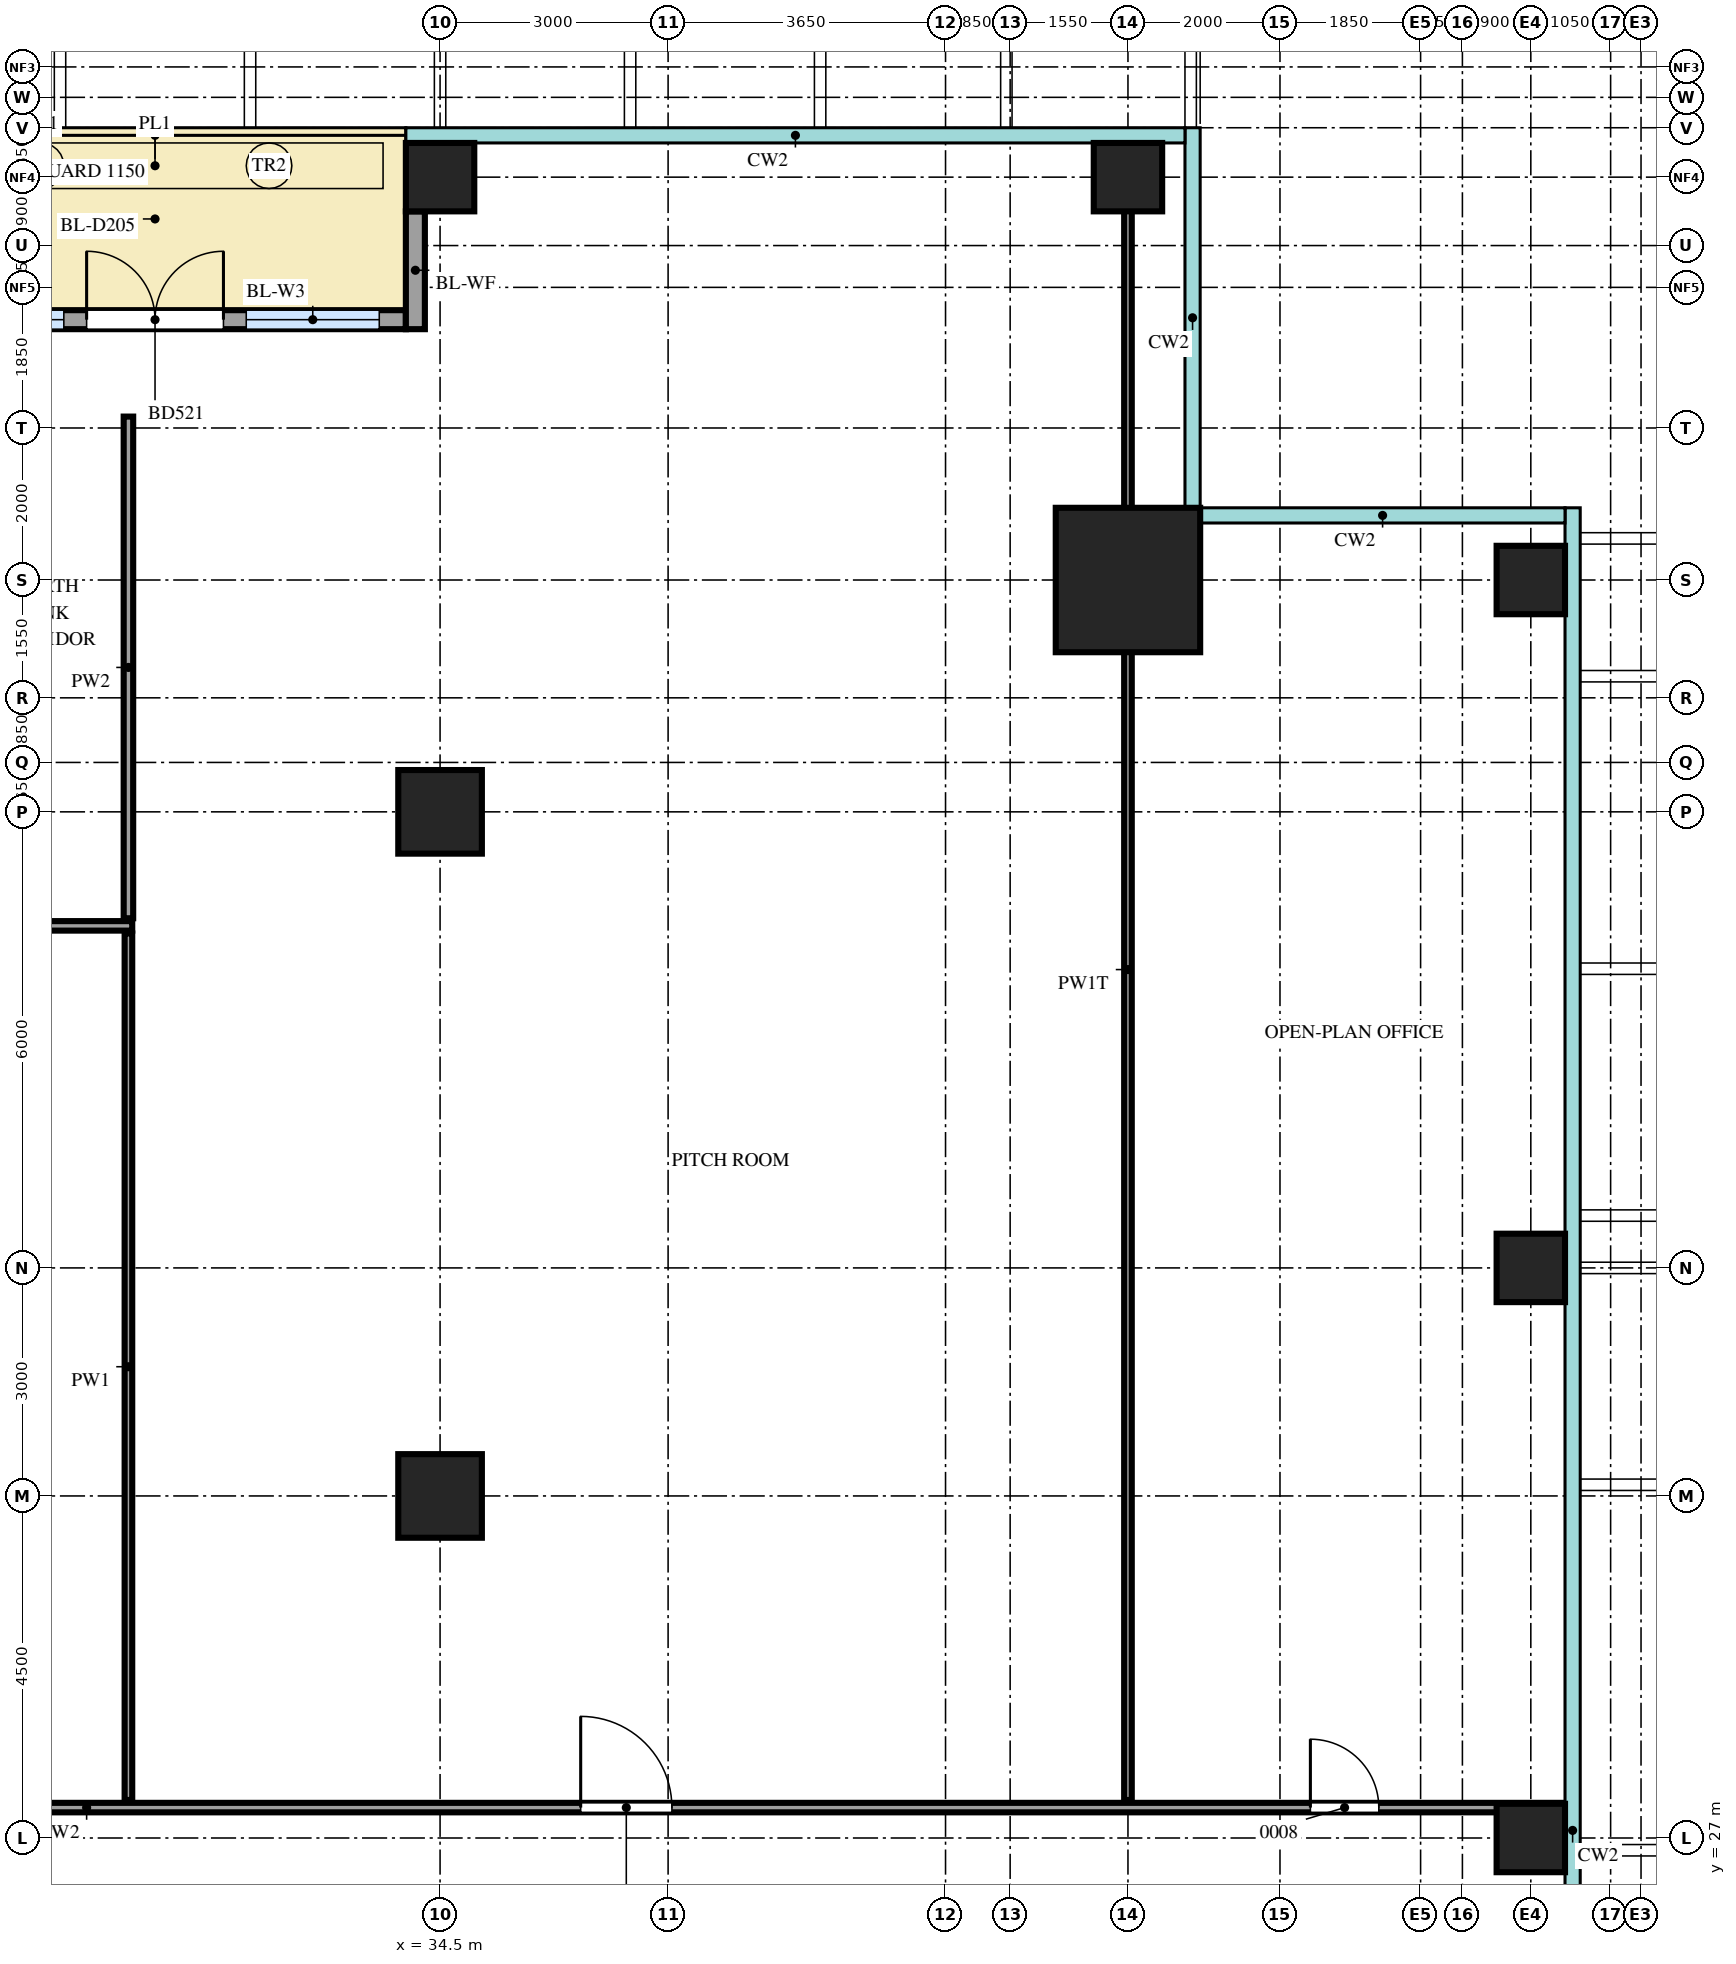
"""IFC4 building model, lengths in metres.
Left out: names, types, materials, properties, quantities, classifications, styles, units other than length and angle.
Written with IfcOpenShell. Run it as: python <this file> out.ifc"""

import sys

from ifc_helpers import new_model, si_unit, direction, frame, frame_2d, origin, origin_2d, place, context, subcontext, project, spatial, rectangle, extrude, source, transform, mapped, element, fill, save


model = new_model("IFC4")
c1 = context("Model", 3, precision=1e-05, world=origin(), true_north=direction((0.0, 1.0)))
c2 = subcontext(c1, "Body", "Model", "MODEL_VIEW")
j1 = project(units=[si_unit("LENGTHUNIT", "METRE"), si_unit("PLANEANGLEUNIT", "RADIAN")], contexts=[c1])
p1 = place(None, origin())
s1 = spatial("IfcSite", under=j1, at=p1, CompositionType="ELEMENT")
p2 = place(p1, origin())
s2 = spatial("IfcBuilding", under=s1, at=p2, CompositionType="ELEMENT")
p3 = place(p2, frame((0.0, 0.0, 234.2)))
s3 = spatial("IfcBuildingStorey", under=s2, at=p3, CompositionType="ELEMENT", Elevation=234.2)
m1 = source(origin(), c2, "Body", "SweptSolid", [
    extrude(rectangle(XDim=1.9, YDim=1.9, at=origin_2d()), origin(), (0.0, 0.0, 1.0), 4.0),
])
p4 = place(p3, frame((43.55, 43.55, 0.0), z_axis=(0.0, 0.0, 1.0), x_axis=(1.0, 0.0, 0.0)))
e1 = element("IfcColumn", 1, at=p4, inside=s3, PredefinedType="COLUMN", context=c2, shape_type="MappedRepresentation", body=[
    mapped(m1, transform((0.0, 0.0, 0.0))),
])
m2 = source(origin(), c2, "Body", "SweptSolid", [
    extrude(rectangle(XDim=0.9, YDim=0.9, at=origin_2d()), origin(), (0.0, 0.0, 1.0), 3.75),
])
for number, where, z_axis, x_axis in (
    (2, (48.85, 27.0, 0.0), (0.0, 0.0, 1.0), (1.0, 0.0, 0.0)),
    (3, (48.85, 34.5, 0.0), (0.0, 0.0, 1.0), (1.0, 0.0, 0.0)),
    (4, (48.85, 43.55, 0.0), (0.0, 0.0, 1.0), (1.0, 0.0, 0.0)),
    (5, (34.5, 48.85, 0.0), (0.0, 0.0, 1.0), (1.0, 0.0, 0.0)),
    (6, (43.55, 48.85, 0.0), (0.0, 0.0, 1.0), (1.0, 0.0, 0.0)),
):
    element("IfcColumn", number, at=place(p3, frame(where, z_axis=z_axis, x_axis=x_axis)), inside=s3, PredefinedType="COLUMN", context=c2, shape_type="MappedRepresentation", body=[
        mapped(m2, transform((0.0, 0.0, 0.0))),
    ])
m3 = source(origin(), c2, "Body", "SweptSolid", [
    extrude(rectangle(XDim=1.1, YDim=1.1, at=origin_2d()), origin(), (0.0, 0.0, 1.0), 3.75),
])
for number, where, z_axis, x_axis in (
    (7, (34.5, 31.5, 0.0), (0.0, 0.0, 1.0), (1.0, 0.0, 0.0)),
    (8, (34.5, 40.5, 0.0), (0.0, 0.0, 1.0), (1.0, 0.0, 0.0)),
):
    element("IfcColumn", number, at=place(p3, frame(where, z_axis=z_axis, x_axis=x_axis)), inside=s3, PredefinedType="COLUMN", context=c2, shape_type="MappedRepresentation", body=[
        mapped(m3, transform((0.0, 0.0, 0.0))),
    ])
m4 = source(origin(), c2, "Body", "SweptSolid", [
    extrude(rectangle(XDim=6.6, YDim=0.25, at=frame_2d((3.3, 0.0))), origin(), (0.0, 0.0, 1.0), 3.75),
])
p5 = place(p3, frame((27.45, 46.975, 0.0), z_axis=(0.0, 0.0, 1.0), x_axis=(1.0, 0.0, 0.0)))
e9 = element("IfcWall", 9, at=p5, inside=s3, PredefinedType="SOLIDWALL", context=c2, shape_type="MappedRepresentation", body=[
    mapped(m4, transform((0.0, 0.0, 0.0))),
])
m5 = source(origin(), c2, "Body", "SweptSolid", [
    extrude(rectangle(XDim=1.75, YDim=2.4, at=frame_2d((0.875, 1.2))), frame((0.0, 0.135, 0.0), z_axis=(0.0, -1.0, 0.0), x_axis=(1.0, 0.0, 0.0)), (0.0, 0.0, 1.0), 0.27),
])
p6 = place(p5, frame((0.35, 0.0, 0.0)))
e10 = element("IfcOpeningElement", 10, at=p6, cuts=e9, PredefinedType="OPENING", context=c2, shape_type="MappedRepresentation", body=[
    mapped(m5, transform((0.0, 0.0, 0.0))),
])
p7 = place(p5, frame((4.5, 0.0, 0.0)))
e11 = element("IfcOpeningElement", 11, at=p7, cuts=e9, PredefinedType="OPENING", context=c2, shape_type="MappedRepresentation", body=[
    mapped(m5, transform((0.0, 0.0, 0.0))),
])
m6 = source(origin(), c2, "Body", "SweptSolid", [
    extrude(rectangle(XDim=1.8, YDim=2.4, at=frame_2d((0.9, 1.2))), frame((0.0, 0.135, 0.0), z_axis=(0.0, -1.0, 0.0), x_axis=(1.0, 0.0, 0.0)), (0.0, 0.0, 1.0), 0.27),
])
p8 = place(p5, frame((2.4, 0.0, 0.0)))
e12 = element("IfcOpeningElement", 12, at=p8, cuts=e9, PredefinedType="OPENING", context=c2, shape_type="MappedRepresentation", body=[
    mapped(m6, transform((0.0, 0.0, 0.0))),
])
m7 = source(origin(), c2, "Body", "SweptSolid", [
    extrude(rectangle(XDim=1.55, YDim=0.25, at=frame_2d((0.775, 0.0))), origin(), (0.0, 0.0, 1.0), 3.45),
])
p9 = place(p3, frame((34.175, 48.4, 0.0), z_axis=(0.0, 0.0, 1.0), x_axis=(0.0, -1.0, 0.0)))
e13 = element("IfcWall", 13, at=p9, inside=s3, PredefinedType="SOLIDWALL", context=c2, shape_type="MappedRepresentation", body=[
    mapped(m7, transform((0.0, 0.0, 0.0))),
])
m8 = source(origin(), c2, "Body", "SweptSolid", [
    extrude(rectangle(XDim=26.0, YDim=0.125, at=frame_2d((13.0, 0.0))), origin(), (0.0, 0.0, 1.0), 3.8),
])
p10 = place(p3, frame((23.35, 27.4, 0.0), z_axis=(0.0, 0.0, 1.0), x_axis=(1.0, 0.0, 0.0)))
e14 = element("IfcWall", 14, at=p10, inside=s3, PredefinedType="PARTITIONING", context=c2, shape_type="MappedRepresentation", body=[
    mapped(m8, transform((0.0, 0.0, 0.0))),
])
m9 = source(origin(), c2, "Body", "SweptSolid", [
    extrude(rectangle(XDim=1.2, YDim=2.1, at=frame_2d((0.6, 1.05))), frame((0.0, 0.073, 0.0), z_axis=(0.0, -1.0, 0.0), x_axis=(1.0, 0.0, 0.0)), (0.0, 0.0, 1.0), 0.145),
])
p11 = place(p10, frame((13.0, 0.0, 0.0)))
e15 = element("IfcOpeningElement", 15, at=p11, cuts=e14, PredefinedType="OPENING", context=c2, shape_type="MappedRepresentation", body=[
    mapped(m9, transform((0.0, 0.0, 0.0))),
])
m10 = source(origin(), c2, "Body", "SweptSolid", [
    extrude(rectangle(XDim=0.9, YDim=2.1, at=frame_2d((0.45, 1.05))), frame((0.0, 0.073, 0.0), z_axis=(0.0, -1.0, 0.0), x_axis=(1.0, 0.0, 0.0)), (0.0, 0.0, 1.0), 0.145),
])
p12 = place(p10, frame((22.6, 0.0, 0.0)))
e16 = element("IfcOpeningElement", 16, at=p12, cuts=e14, PredefinedType="OPENING", context=c2, shape_type="MappedRepresentation", body=[
    mapped(m10, transform((0.0, 0.0, 0.0))),
])
m11 = source(origin(), c2, "Body", "SweptSolid", [
    extrude(rectangle(XDim=11.4, YDim=0.1, at=frame_2d((5.7, 0.0))), origin(), (0.0, 0.0, 1.0), 3.8),
])
p13 = place(p3, frame((30.4, 27.5, 0.0), z_axis=(0.0, 0.0, 1.0), x_axis=(0.0, 1.0, 0.0)))
e17 = element("IfcWall", 17, at=p13, inside=s3, PredefinedType="PARTITIONING", context=c2, shape_type="MappedRepresentation", body=[
    mapped(m11, transform((0.0, 0.0, 0.0))),
])
m12 = source(origin(), c2, "Body", "SweptSolid", [
    extrude(rectangle(XDim=21.85, YDim=0.1, at=frame_2d((10.925, 0.0))), origin(), (0.0, 0.0, 1.0), 3.3),
])
p14 = place(p3, frame((43.55, 27.5, 0.0), z_axis=(0.0, 0.0, 1.0), x_axis=(0.0, 1.0, 0.0)))
e18 = element("IfcWall", 18, at=p14, inside=s3, PredefinedType="PARTITIONING", context=c2, shape_type="MappedRepresentation", body=[
    mapped(m12, transform((0.0, 0.0, 0.0))),
])
m13 = source(origin(), c2, "Body", "SweptSolid", [
    extrude(rectangle(XDim=7.1, YDim=0.125, at=frame_2d((3.55, 0.0))), origin(), (0.0, 0.0, 1.0), 3.8),
])
p15 = place(p3, frame((23.35, 39.0, 0.0), z_axis=(0.0, 0.0, 1.0), x_axis=(1.0, 0.0, 0.0)))
e19 = element("IfcWall", 19, at=p15, inside=s3, PredefinedType="PARTITIONING", context=c2, shape_type="MappedRepresentation", body=[
    mapped(m13, transform((0.0, 0.0, 0.0))),
])
m14 = source(origin(), c2, "Body", "SweptSolid", [
    extrude(rectangle(XDim=6.6, YDim=0.125, at=frame_2d((3.3, 0.0))), origin(), (0.0, 0.0, 1.0), 3.8),
])
p16 = place(p3, frame((30.4, 39.1, 0.0), z_axis=(0.0, 0.0, 1.0), x_axis=(0.0, 1.0, 0.0)))
e20 = element("IfcWall", 20, at=p16, inside=s3, PredefinedType="PARTITIONING", context=c2, shape_type="MappedRepresentation", body=[
    mapped(m14, transform((0.0, 0.0, 0.0))),
])
m15 = source(origin(), c2, "Body", "SweptSolid", [
    extrude(rectangle(XDim=1.75, YDim=2.4, at=frame_2d((0.875, 1.2))), frame((0.0, 0.03, 0.0), z_axis=(0.0, -1.0, 0.0), x_axis=(1.0, 0.0, 0.0)), (0.0, 0.0, 1.0), 0.06),
])
p17 = place(p6, origin())
e21 = element("IfcWindow", 21, at=p17, inside=s3, PartitioningType="SINGLE_PANEL", PredefinedType="WINDOW", context=c2, shape_type="MappedRepresentation", body=[
    mapped(m15, transform((0.0, 0.0, 0.0))),
])
fill(e10, e21)
p18 = place(p7, origin())
e22 = element("IfcWindow", 22, at=p18, inside=s3, PartitioningType="SINGLE_PANEL", PredefinedType="WINDOW", context=c2, shape_type="MappedRepresentation", body=[
    mapped(m15, transform((0.0, 0.0, 0.0))),
])
fill(e11, e22)
m16 = source(origin(), c2, "Body", "SweptSolid", [
    extrude(rectangle(XDim=1.8, YDim=2.4, at=frame_2d((0.9, 1.2))), frame((0.0, 0.025, 0.0), z_axis=(0.0, -1.0, 0.0), x_axis=(1.0, 0.0, 0.0)), (0.0, 0.0, 1.0), 0.05),
])
p19 = place(p8, origin())
e23 = element("IfcDoor", 23, at=p19, inside=s3, OperationType="DOUBLE_DOOR_DOUBLE_SWING", PredefinedType="DOOR", context=c2, shape_type="MappedRepresentation", body=[
    mapped(m16, transform((0.0, 0.0, 0.0))),
])
fill(e12, e23)
m17 = source(origin(), c2, "Body", "SweptSolid", [
    extrude(rectangle(XDim=1.2, YDim=2.1, at=frame_2d((0.6, 1.05))), frame((0.0, 0.025, 0.0), z_axis=(0.0, -1.0, 0.0), x_axis=(1.0, 0.0, 0.0)), (0.0, 0.0, 1.0), 0.05),
])
p20 = place(p11, origin())
e24 = element("IfcDoor", 24, at=p20, inside=s3, OperationType="SINGLE_SWING_RIGHT", PredefinedType="DOOR", context=c2, shape_type="MappedRepresentation", body=[
    mapped(m17, transform((0.0, 0.0, 0.0))),
])
fill(e15, e24)
m18 = source(origin(), c2, "Body", "SweptSolid", [
    extrude(rectangle(XDim=0.9, YDim=2.1, at=frame_2d((0.45, 1.05))), frame((0.0, 0.025, 0.0), z_axis=(0.0, -1.0, 0.0), x_axis=(1.0, 0.0, 0.0)), (0.0, 0.0, 1.0), 0.05),
])
p21 = place(p12, origin())
e25 = element("IfcDoor", 25, at=p21, inside=s3, OperationType="SINGLE_SWING_RIGHT", PredefinedType="DOOR", context=c2, shape_type="MappedRepresentation", body=[
    mapped(m18, transform((0.0, 0.0, 0.0))),
])
fill(e16, e25)
save(model, sys.argv[1])
